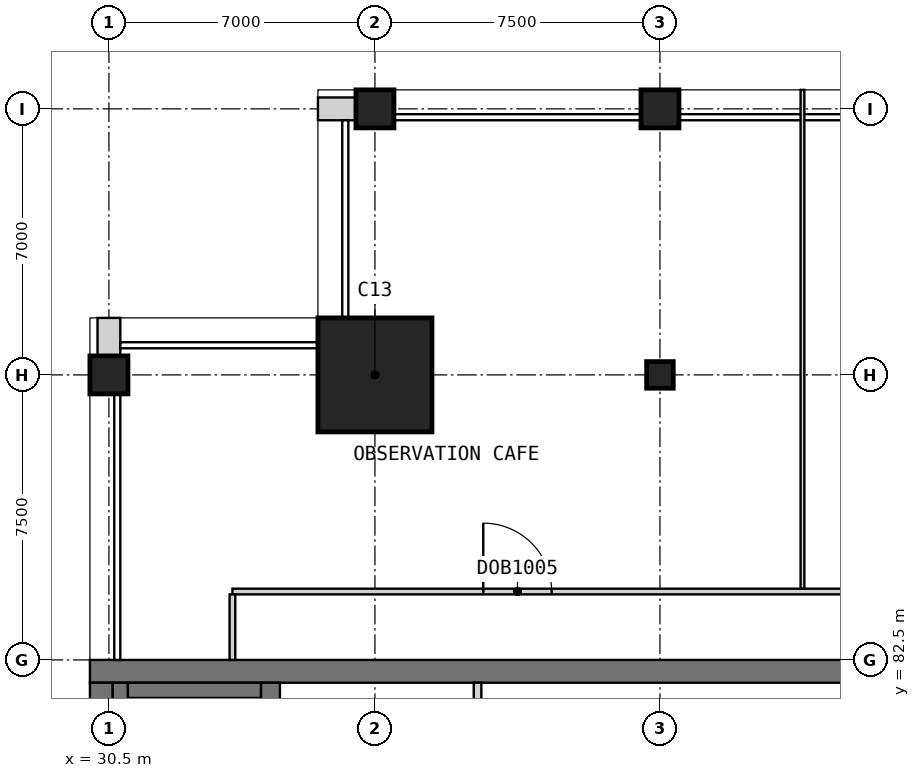
"""IFC4 building model, lengths in metres.
Left out: names, types, materials, properties, quantities, classifications, styles, units other than length and angle.
Written with IfcOpenShell. Run it as: python <this file> out.ifc"""

import sys

from ifc_helpers import new_model, si_unit, direction, frame, frame_2d, origin, origin_2d, place, context, subcontext, project, spatial, rectangle, extrude, element, fill, save


model = new_model("IFC4")
c1 = context("Model", 3, precision=1e-05, world=origin(), true_north=direction((0.0, 1.0)))
c2 = subcontext(c1, "Body", "Model", "MODEL_VIEW")
j1 = project(units=[si_unit("LENGTHUNIT", "METRE"), si_unit("PLANEANGLEUNIT", "RADIAN")], contexts=[c1])
p1 = place(None, origin())
s1 = spatial("IfcSite", under=j1, at=p1, CompositionType="ELEMENT")
p2 = place(p1, origin())
s2 = spatial("IfcBuilding", under=s1, at=p2, CompositionType="ELEMENT")
p3 = place(p2, frame((0.0, 0.0, 302.7)))
s3 = spatial("IfcBuildingStorey", under=s2, at=p3, CompositionType="ELEMENT", Elevation=302.7)
for number, where, z_axis, x_axis in (
    (1, (30.5, 90.0, 0.0), (0.0, 0.0, 1.0), (1.0, 0.0, 0.0)),
    (2, (37.5, 97.0, 0.0), (0.0, 0.0, 1.0), (1.0, 0.0, 0.0)),
):
    element("IfcColumn", number, at=place(p3, frame(where, z_axis=z_axis, x_axis=x_axis)), inside=s3, PredefinedType="COLUMN", context=c2, shape_type="SweptSolid", body=[
        extrude(rectangle(XDim=1.0, YDim=1.0, at=origin_2d()), origin(), (0.0, 0.0, 1.0), 6.0),
    ])
p4 = place(p3, frame((45.0, 90.0, 0.0), z_axis=(0.0, 0.0, 1.0), x_axis=(1.0, 0.0, 0.0)))
e3 = element("IfcColumn", 3, at=p4, inside=s3, PredefinedType="COLUMN", context=c2, shape_type="SweptSolid", body=[
    extrude(rectangle(XDim=0.7, YDim=0.7, at=origin_2d()), origin(), (0.0, 0.0, 1.0), 6.0),
])
p5 = place(p3, frame((45.0, 97.0, 0.0), z_axis=(0.0, 0.0, 1.0), x_axis=(1.0, 0.0, 0.0)))
e4 = element("IfcColumn", 4, at=p5, inside=s3, PredefinedType="COLUMN", context=c2, shape_type="SweptSolid", body=[
    extrude(rectangle(XDim=1.0, YDim=1.0, at=origin_2d()), origin(), (0.0, 0.0, 1.0), 6.0),
])
p6 = place(p3, frame((37.5, 90.0, 0.0), z_axis=(0.0, 0.0, 1.0), x_axis=(1.0, 0.0, 0.0)))
e5 = element("IfcColumn", 5, at=p6, inside=s3, PredefinedType="COLUMN", context=c2, shape_type="SweptSolid", body=[
    extrude(rectangle(XDim=3.0, YDim=3.0, at=origin_2d()), origin(), (0.0, 0.0, 1.0), 6.0),
])
p7 = place(p3, frame((30.0, 82.2, 0.0), z_axis=(0.0, 0.0, 1.0), x_axis=(1.0, 0.0, 0.0)))
e6 = element("IfcWall", 6, at=p7, inside=s3, PredefinedType="SHEAR", context=c2, shape_type="SweptSolid", body=[
    extrude(rectangle(XDim=30.0, YDim=0.6, at=frame_2d((15.0, 0.0))), origin(), (0.0, 0.0, 1.0), 6.0),
])
p8 = place(p3, frame((30.3, 60.6, 0.0), z_axis=(0.0, 0.0, 1.0), x_axis=(0.0, 1.0, 0.0)))
e7 = element("IfcWall", 7, at=p8, inside=s3, PredefinedType="SHEAR", context=c2, shape_type="SweptSolid", body=[
    extrude(rectangle(XDim=21.3, YDim=0.6, at=frame_2d((10.65, 0.0))), origin(), (0.0, 0.0, 1.0), 6.0),
])
p9 = place(p3, frame((34.75, 78.3, 0.0), z_axis=(0.0, 0.0, 1.0), x_axis=(0.0, 1.0, 0.0)))
e8 = element("IfcWall", 8, at=p9, inside=s3, PredefinedType="SHEAR", context=c2, shape_type="SweptSolid", body=[
    extrude(rectangle(XDim=3.6, YDim=0.5, at=frame_2d((1.8, 0.0))), origin(), (0.0, 0.0, 1.0), 6.0),
])
for number, where, z_axis, x_axis in (
    (9, (37.0, 97.0, 0.0), (0.0, 0.0, 1.0), (-1.0, 0.0, 0.0)),
    (10, (30.5, 91.5, 0.0), (0.0, 0.0, 1.0), (0.0, -1.0, 0.0)),
):
    element("IfcWall", number, at=place(p3, frame(where, z_axis=z_axis, x_axis=x_axis)), inside=s3, PredefinedType="SOLIDWALL", context=c2, shape_type="SweptSolid", body=[
        extrude(rectangle(XDim=1.0, YDim=0.6, at=frame_2d((0.5, 0.0))), origin(), (0.0, 0.0, 1.0), 5.7),
    ])
p10 = place(p3, frame((40.2, 78.5, 0.0), z_axis=(0.0, 0.0, 1.0), x_axis=(0.0, 1.0, 0.0)))
e11 = element("IfcWall", 11, at=p10, inside=s3, PredefinedType="SOLIDWALL", context=c2, shape_type="SweptSolid", body=[
    extrude(rectangle(XDim=3.4, YDim=0.2, at=frame_2d((1.7, 0.0))), origin(), (0.0, 0.0, 1.0), 6.0),
])
p11 = place(p3, frame((30.8, 60.6, 0.0), z_axis=(0.0, 0.0, 1.0), x_axis=(0.0, 1.0, 0.0)))
e12 = element("IfcWall", 12, at=p11, inside=s3, PredefinedType="SOLIDWALL", context=c2, shape_type="SweptSolid", body=[
    extrude(rectangle(XDim=21.3, YDim=0.4, at=frame_2d((10.65, 0.0))), origin(), (0.0, 0.0, 1.0), 5.7),
])
p12 = place(p3, frame((31.0, 81.7, 0.0), z_axis=(0.0, 0.0, 1.0), x_axis=(1.0, 0.0, 0.0)))
e13 = element("IfcWall", 13, at=p12, inside=s3, PredefinedType="SOLIDWALL", context=c2, shape_type="SweptSolid", body=[
    extrude(rectangle(XDim=3.5, YDim=0.4, at=frame_2d((1.75, 0.0))), origin(), (0.0, 0.0, 1.0), 5.7),
])
p13 = place(p3, frame((33.75, 84.3, 0.0), z_axis=(0.0, 0.0, 1.0), x_axis=(1.0, 0.0, 0.0)))
e14 = element("IfcWall", 14, at=p13, inside=s3, PredefinedType="PARTITIONING", context=c2, shape_type="SweptSolid", body=[
    extrude(rectangle(XDim=28.05, YDim=0.15, at=frame_2d((14.025, 0.0))), origin(), (0.0, 0.0, 1.0), 5.7),
])
p14 = place(p13, frame((6.6, 0.0, 0.0)))
e15 = element("IfcOpeningElement", 15, at=p14, cuts=e14, PredefinedType="OPENING", context=c2, shape_type="SweptSolid", body=[
    extrude(rectangle(XDim=1.8, YDim=2.1, at=frame_2d((0.9, 1.05))), frame((0.0, 0.085, 0.0), z_axis=(0.0, -1.0, 0.0), x_axis=(1.0, 0.0, 0.0)), (0.0, 0.0, 1.0), 0.17),
])
p15 = place(p13, frame((18.25, 0.0, 0.0)))
e16 = element("IfcOpeningElement", 16, at=p15, cuts=e14, PredefinedType="OPENING", context=c2, shape_type="SweptSolid", body=[
    extrude(rectangle(XDim=1.0, YDim=2.1, at=frame_2d((0.5, 1.05))), frame((0.0, 0.085, 0.0), z_axis=(0.0, -1.0, 0.0), x_axis=(1.0, 0.0, 0.0)), (0.0, 0.0, 1.0), 0.17),
])
p16 = place(p13, frame((23.875, 0.0, 0.0)))
e17 = element("IfcOpeningElement", 17, at=p16, cuts=e14, PredefinedType="OPENING", context=c2, shape_type="SweptSolid", body=[
    extrude(rectangle(XDim=1.0, YDim=2.1, at=frame_2d((0.5, 1.05))), frame((0.0, 0.085, 0.0), z_axis=(0.0, -1.0, 0.0), x_axis=(1.0, 0.0, 0.0)), (0.0, 0.0, 1.0), 0.17),
])
p17 = place(p13, frame((26.65, 0.0, 0.0)))
e18 = element("IfcOpeningElement", 18, at=p17, cuts=e14, PredefinedType="OPENING", context=c2, shape_type="SweptSolid", body=[
    extrude(rectangle(XDim=1.0, YDim=2.1, at=frame_2d((0.5, 1.05))), frame((0.0, 0.085, 0.0), z_axis=(0.0, -1.0, 0.0), x_axis=(1.0, 0.0, 0.0)), (0.0, 0.0, 1.0), 0.17),
])
p18 = place(p3, frame((33.75, 82.5, 0.0), z_axis=(0.0, 0.0, 1.0), x_axis=(0.0, 1.0, 0.0)))
e19 = element("IfcWall", 19, at=p18, inside=s3, PredefinedType="PARTITIONING", context=c2, shape_type="SweptSolid", body=[
    extrude(rectangle(XDim=1.725, YDim=0.15, at=frame_2d((0.863, 0.0))), origin(), (0.0, 0.0, 1.0), 5.7),
])
p19 = place(p3, frame((48.75, 84.375, 0.0), z_axis=(0.0, 0.0, 1.0), x_axis=(0.0, 1.0, 0.0)))
e20 = element("IfcWall", 20, at=p19, inside=s3, PredefinedType="PARTITIONING", context=c2, shape_type="SweptSolid", body=[
    extrude(rectangle(XDim=13.125, YDim=0.1, at=frame_2d((6.562, 0.0))), origin(), (0.0, 0.0, 1.0), 5.7),
])
p20 = place(p14, origin())
e21 = element("IfcDoor", 21, at=p20, inside=s3, OperationType="DOUBLE_DOOR_SINGLE_SWING", PredefinedType="DOOR", context=c2, shape_type="SweptSolid", body=[
    extrude(rectangle(XDim=1.8, YDim=2.1, at=frame_2d((0.9, 1.05))), frame((0.0, 0.025, 0.0), z_axis=(0.0, -1.0, 0.0), x_axis=(1.0, 0.0, 0.0)), (0.0, 0.0, 1.0), 0.05),
])
fill(e15, e21)
save(model, sys.argv[1])
